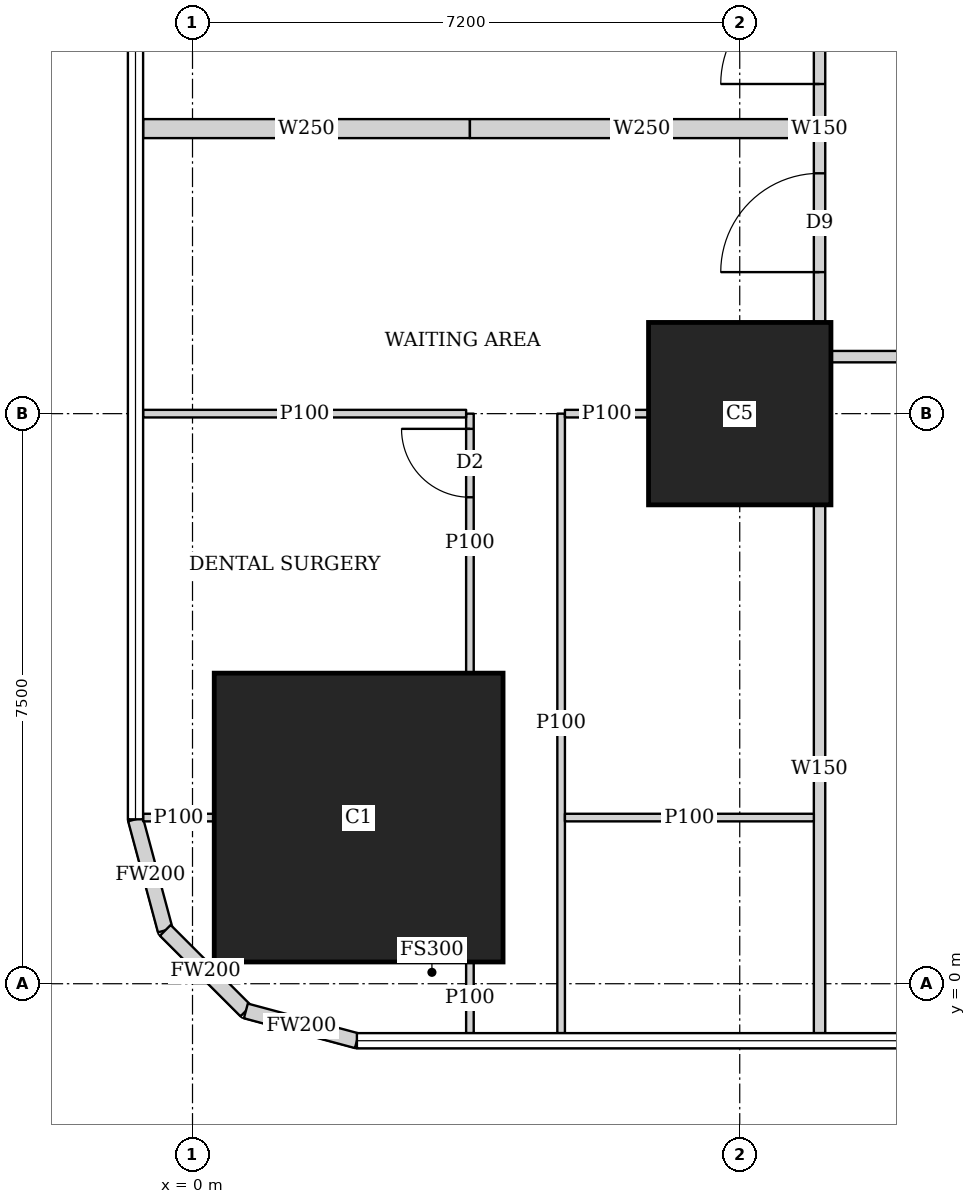
"""IFC4 building model, lengths in metres.
Left out: names, types, materials, properties, quantities, classifications, styles, units other than length and angle.
Written with IfcOpenShell. Run it as: python <this file> out.ifc"""

import sys

from ifc_helpers import new_model, si_unit, direction, frame, frame_2d, origin, origin_2d, place, context, subcontext, project, spatial, rectangle, extrude, element, fill, save


model = new_model("IFC4")
c1 = context("Model", 3, precision=1e-05, world=origin(), true_north=direction((0.0, 1.0)))
c2 = subcontext(c1, "Body", "Model", "MODEL_VIEW")
j1 = project(units=[si_unit("LENGTHUNIT", "METRE"), si_unit("PLANEANGLEUNIT", "RADIAN")], contexts=[c1])
p1 = place(None, origin())
s1 = spatial("IfcSite", under=j1, at=p1, CompositionType="ELEMENT")
p2 = place(p1, origin())
s2 = spatial("IfcBuilding", under=s1, at=p2, CompositionType="ELEMENT")
p3 = place(p2, frame((0.0, 0.0, 10.1)))
s3 = spatial("IfcBuildingStorey", under=s2, at=p3, CompositionType="ELEMENT", Elevation=10.1)
p4 = place(p3, frame((2.186, 2.186, 0.0), z_axis=(0.0, 0.0, 1.0), x_axis=(1.0, 0.0, 0.0)))
e1 = element("IfcColumn", 1, at=p4, inside=s3, PredefinedType="COLUMN", context=c2, shape_type="SweptSolid", body=[
    extrude(rectangle(XDim=3.8, YDim=3.8, at=origin_2d()), origin(), (0.0, 0.0, 1.0), 4.5),
])
p5 = place(p3, frame((7.2, 7.5, 0.0), z_axis=(0.0, 0.0, 1.0), x_axis=(1.0, 0.0, 0.0)))
e2 = element("IfcColumn", 2, at=p5, inside=s3, PredefinedType="COLUMN", context=c2, shape_type="SweptSolid", body=[
    extrude(rectangle(XDim=2.4, YDim=2.4, at=origin_2d()), origin(), (0.0, 0.0, 1.0), 4.5),
])
p6 = place(p3, frame((-0.75, 2.163, 0.0), z_axis=(0.0, 0.0, 1.0), x_axis=(0.259168954497, -0.965832000415, 0.0)))
e3 = element("IfcWall", 3, at=p6, inside=s3, PredefinedType="SOLIDWALL", context=c2, shape_type="SweptSolid", body=[
    extrude(rectangle(XDim=1.513, YDim=0.2, at=frame_2d((0.756, 0.0))), origin(), (0.0, 0.0, 1.0), 4.2),
])
p7 = place(p3, frame((-0.358, 0.702, 0.0), z_axis=(0.0, 0.0, 1.0), x_axis=(0.707106781187, -0.707106781187, 0.0)))
e4 = element("IfcWall", 4, at=p7, inside=s3, PredefinedType="SOLIDWALL", context=c2, shape_type="SweptSolid", body=[
    extrude(rectangle(XDim=1.499, YDim=0.2, at=frame_2d((0.75, 0.0))), origin(), (0.0, 0.0, 1.0), 4.2),
])
p8 = place(p3, frame((0.702, -0.358, 0.0), z_axis=(0.0, 0.0, 1.0), x_axis=(0.965832000415, -0.259168954497, 0.0)))
e5 = element("IfcWall", 5, at=p8, inside=s3, PredefinedType="SOLIDWALL", context=c2, shape_type="SweptSolid", body=[
    extrude(rectangle(XDim=1.513, YDim=0.2, at=frame_2d((0.756, 0.0))), origin(), (0.0, 0.0, 1.0), 4.2),
])
p9 = place(p3, frame((8.25, -0.65, 0.0), z_axis=(0.0, 0.0, 1.0), x_axis=(0.0, 1.0, 0.0)))
e6 = element("IfcWall", 6, at=p9, inside=s3, PredefinedType="SOLIDWALL", context=c2, shape_type="SweptSolid", body=[
    extrude(rectangle(XDim=6.949, YDim=0.15, at=frame_2d((3.475, 0.0))), origin(), (0.0, 0.0, 1.0), 2.4),
])
p10 = place(p3, frame((8.25, 8.701, 0.0), z_axis=(0.0, 0.0, 1.0), x_axis=(0.0, 1.0, 0.0)))
e7 = element("IfcWall", 7, at=p10, inside=s3, PredefinedType="SOLIDWALL", context=c2, shape_type="SweptSolid", body=[
    extrude(rectangle(XDim=5.098, YDim=0.15, at=frame_2d((2.549, 0.0))), origin(), (0.0, 0.0, 1.0), 4.2),
])
p11 = place(p10, frame((0.661, 0.0, 0.0)))
e8 = element("IfcOpeningElement", 8, at=p11, cuts=e7, PredefinedType="OPENING", context=c2, shape_type="SweptSolid", body=[
    extrude(rectangle(XDim=1.3, YDim=2.1, at=frame_2d((0.65, 1.05))), frame((0.0, 0.085, 0.0), z_axis=(0.0, -1.0, 0.0), x_axis=(1.0, 0.0, 0.0)), (0.0, 0.0, 1.0), 0.17),
])
p12 = place(p10, frame((3.136, 0.0, 0.0)))
e9 = element("IfcOpeningElement", 9, at=p12, cuts=e7, PredefinedType="OPENING", context=c2, shape_type="SweptSolid", body=[
    extrude(rectangle(XDim=1.3, YDim=2.1, at=frame_2d((0.65, 1.05))), frame((0.0, 0.085, 0.0), z_axis=(0.0, -1.0, 0.0), x_axis=(1.0, 0.0, 0.0)), (0.0, 0.0, 1.0), 0.17),
])
p13 = place(p3, frame((13.199, 8.25, 0.0), z_axis=(0.0, 0.0, 1.0), x_axis=(-1.0, 0.0, 0.0)))
e10 = element("IfcWall", 10, at=p13, inside=s3, PredefinedType="SOLIDWALL", context=c2, shape_type="SweptSolid", body=[
    extrude(rectangle(XDim=4.798, YDim=0.15, at=frame_2d((2.399, 0.0))), origin(), (0.0, 0.0, 1.0), 2.6),
])
p14 = place(p13, frame((1.224, 0.0, 0.0)))
e11 = element("IfcOpeningElement", 11, at=p14, cuts=e10, PredefinedType="OPENING", context=c2, shape_type="SweptSolid", body=[
    extrude(rectangle(XDim=1.3, YDim=2.1, at=frame_2d((0.65, 1.05))), frame((0.0, 0.085, 0.0), z_axis=(0.0, -1.0, 0.0), x_axis=(1.0, 0.0, 0.0)), (0.0, 0.0, 1.0), 0.17),
])
p15 = place(p3, frame((3.65, -0.65, 0.0), z_axis=(0.0, 0.0, 1.0), x_axis=(0.0, 1.0, 0.0)))
e12 = element("IfcWall", 12, at=p15, inside=s3, PredefinedType="PARTITIONING", context=c2, shape_type="SweptSolid", body=[
    extrude(rectangle(XDim=0.935, YDim=0.1, at=frame_2d((0.467, 0.0))), origin(), (0.0, 0.0, 1.0), 4.2),
])
p16 = place(p3, frame((3.65, 4.087, 0.0), z_axis=(0.0, 0.0, 1.0), x_axis=(0.0, 1.0, 0.0)))
e13 = element("IfcWall", 13, at=p16, inside=s3, PredefinedType="PARTITIONING", context=c2, shape_type="SweptSolid", body=[
    extrude(rectangle(XDim=3.413, YDim=0.1, at=frame_2d((1.707, 0.0))), origin(), (0.0, 0.0, 1.0), 4.2),
])
p17 = place(p16, frame((2.313, 0.0, 0.0)))
e14 = element("IfcOpeningElement", 14, at=p17, cuts=e13, PredefinedType="OPENING", context=c2, shape_type="SweptSolid", body=[
    extrude(rectangle(XDim=0.9, YDim=2.1, at=frame_2d((0.45, 1.05))), frame((0.0, 0.06, 0.0), z_axis=(0.0, -1.0, 0.0), x_axis=(1.0, 0.0, 0.0)), (0.0, 0.0, 1.0), 0.12),
])
p18 = place(p3, frame((4.85, -0.65, 0.0), z_axis=(0.0, 0.0, 1.0), x_axis=(0.0, 1.0, 0.0)))
e15 = element("IfcWall", 15, at=p18, inside=s3, PredefinedType="PARTITIONING", context=c2, shape_type="SweptSolid", body=[
    extrude(rectangle(XDim=8.15, YDim=0.1, at=frame_2d((4.075, 0.0))), origin(), (0.0, 0.0, 1.0), 2.4),
])
p19 = place(p3, frame((-0.65, 2.186, 0.0), z_axis=(0.0, 0.0, 1.0), x_axis=(1.0, 0.0, 0.0)))
e16 = element("IfcWall", 16, at=p19, inside=s3, PredefinedType="PARTITIONING", context=c2, shape_type="SweptSolid", body=[
    extrude(rectangle(XDim=0.935, YDim=0.1, at=frame_2d((0.467, 0.0))), origin(), (0.0, 0.0, 1.0), 4.2),
])
p20 = place(p3, frame((-0.65, 7.5, 0.0), z_axis=(0.0, 0.0, 1.0), x_axis=(1.0, 0.0, 0.0)))
e17 = element("IfcWall", 17, at=p20, inside=s3, PredefinedType="PARTITIONING", context=c2, shape_type="SweptSolid", body=[
    extrude(rectangle(XDim=4.25, YDim=0.1, at=frame_2d((2.125, 0.0))), origin(), (0.0, 0.0, 1.0), 2.4),
])
p21 = place(p3, frame((4.9, 2.186, 0.0), z_axis=(0.0, 0.0, 1.0), x_axis=(1.0, 0.0, 0.0)))
e18 = element("IfcWall", 18, at=p21, inside=s3, PredefinedType="PARTITIONING", context=c2, shape_type="SweptSolid", body=[
    extrude(rectangle(XDim=3.275, YDim=0.1, at=frame_2d((1.638, 0.0))), origin(), (0.0, 0.0, 1.0), 2.4),
])
p22 = place(p3, frame((4.9, 7.5, 0.0), z_axis=(0.0, 0.0, 1.0), x_axis=(1.0, 0.0, 0.0)))
e19 = element("IfcWall", 19, at=p22, inside=s3, PredefinedType="PARTITIONING", context=c2, shape_type="SweptSolid", body=[
    extrude(rectangle(XDim=1.099, YDim=0.1, at=frame_2d((0.55, 0.0))), origin(), (0.0, 0.0, 1.0), 4.2),
])
p23 = place(p3, frame((-0.65, 11.25, 0.0), z_axis=(0.0, 0.0, 1.0), x_axis=(1.0, 0.0, 0.0)))
e20 = element("IfcWall", 20, at=p23, inside=s3, PredefinedType="SOLIDWALL", context=c2, shape_type="SweptSolid", body=[
    extrude(rectangle(XDim=4.3, YDim=0.25, at=frame_2d((2.15, 0.0))), origin(), (0.0, 0.0, 1.0), 2.4),
])
p24 = place(p3, frame((3.65, 11.25, 0.0), z_axis=(0.0, 0.0, 1.0), x_axis=(1.0, 0.0, 0.0)))
e21 = element("IfcWall", 21, at=p24, inside=s3, PredefinedType="SOLIDWALL", context=c2, shape_type="SweptSolid", body=[
    extrude(rectangle(XDim=4.525, YDim=0.25, at=frame_2d((2.263, 0.0))), origin(), (0.0, 0.0, 1.0), 2.6),
])
p25 = place(p17, origin())
e22 = element("IfcDoor", 22, at=p25, inside=s3, OperationType="SINGLE_SWING_RIGHT", PredefinedType="DOOR", context=c2, shape_type="SweptSolid", body=[
    extrude(rectangle(XDim=0.9, YDim=2.1, at=frame_2d((0.45, 1.05))), frame((0.0, 0.025, 0.0), z_axis=(0.0, -1.0, 0.0), x_axis=(1.0, 0.0, 0.0)), (0.0, 0.0, 1.0), 0.05),
])
fill(e14, e22)
p26 = place(p11, origin())
e23 = element("IfcDoor", 23, at=p26, inside=s3, OperationType="DOUBLE_DOOR_SINGLE_SWING", PredefinedType="DOOR", context=c2, shape_type="SweptSolid", body=[
    extrude(rectangle(XDim=1.3, YDim=2.1, at=frame_2d((0.65, 1.05))), frame((0.0, 0.025, 0.0), z_axis=(0.0, -1.0, 0.0), x_axis=(1.0, 0.0, 0.0)), (0.0, 0.0, 1.0), 0.05),
])
fill(e8, e23)
p27 = place(p12, origin())
e24 = element("IfcDoor", 24, at=p27, inside=s3, OperationType="DOUBLE_DOOR_SINGLE_SWING", PredefinedType="DOOR", context=c2, shape_type="SweptSolid", body=[
    extrude(rectangle(XDim=1.3, YDim=2.1, at=frame_2d((0.65, 1.05))), frame((0.0, 0.025, 0.0), z_axis=(0.0, -1.0, 0.0), x_axis=(1.0, 0.0, 0.0)), (0.0, 0.0, 1.0), 0.05),
])
fill(e9, e24)
save(model, sys.argv[1])
